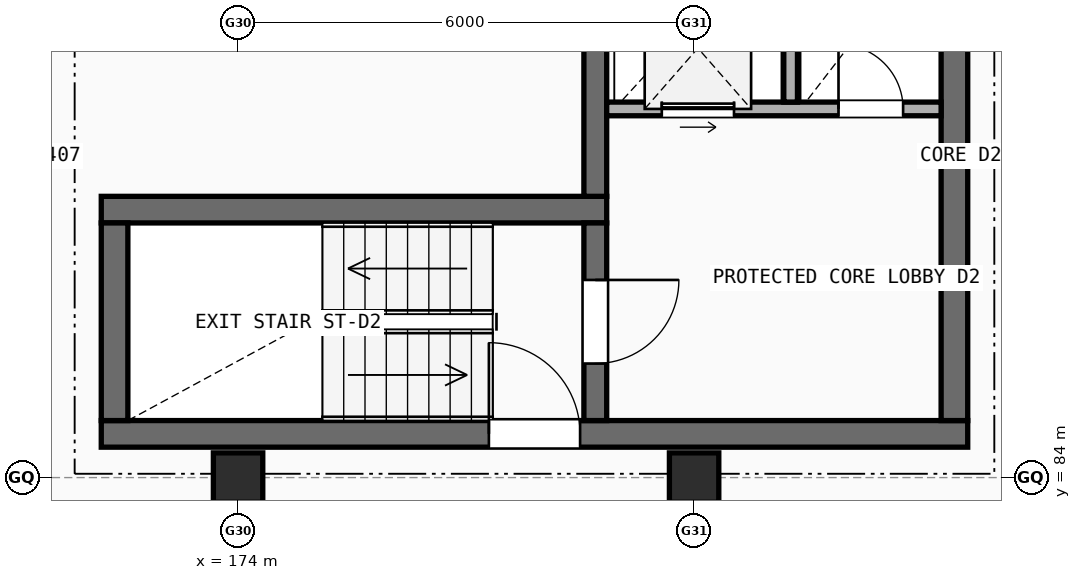
"""IFC4 building model, lengths in metres.
Left out: names, types, materials, properties, quantities, classifications, styles, units other than length and angle.
Written with IfcOpenShell. Run it as: python <this file> out.ifc"""

import sys

from ifc_helpers import new_model, si_unit, direction, frame, frame_2d, origin, origin_2d, place, context, subcontext, project, spatial, rectangle, extrude, element, fill, save


model = new_model("IFC4")
c1 = context("Model", 3, precision=1e-05, world=origin(), true_north=direction((0.0, 1.0)))
c2 = subcontext(c1, "Body", "Model", "MODEL_VIEW")
j1 = project(units=[si_unit("LENGTHUNIT", "METRE"), si_unit("PLANEANGLEUNIT", "RADIAN")], contexts=[c1])
p1 = place(None, origin())
s1 = spatial("IfcSite", under=j1, at=p1, CompositionType="ELEMENT")
p2 = place(p1, origin())
s2 = spatial("IfcBuilding", under=s1, at=p2, CompositionType="ELEMENT")
p3 = place(p2, frame((0.0, 0.0, 10.9)))
s3 = spatial("IfcBuildingStorey", under=s2, at=p3, CompositionType="ELEMENT", Elevation=10.9)
for number, where, z_axis, x_axis in (
    (1, (174.0, 84.0, 0.0), (0.0, 0.0, 1.0), (1.0, 0.0, 0.0)),
    (2, (180.0, 84.0, 0.0), (0.0, 0.0, 1.0), (1.0, 0.0, 0.0)),
):
    element("IfcColumn", number, at=place(p3, frame(where, z_axis=z_axis, x_axis=x_axis)), inside=s3, PredefinedType="COLUMN", context=c2, shape_type="SweptSolid", body=[
        extrude(rectangle(XDim=0.65, YDim=0.65, at=origin_2d()), origin(), (0.0, 0.0, 1.0), 2.96),
    ])
p4 = place(p3, frame((172.2, 84.575, 0.0), z_axis=(0.0, 0.0, 1.0), x_axis=(1.0, 0.0, 0.0)))
e3 = element("IfcWall", 3, at=p4, inside=s3, PredefinedType="SHEAR", context=c2, shape_type="SweptSolid", body=[
    extrude(rectangle(XDim=11.4, YDim=0.35, at=frame_2d((5.7, 0.0))), origin(), (0.0, 0.0, 1.0), 2.96),
])
p5 = place(p4, frame((5.1, 0.0, 0.0)))
e4 = element("IfcOpeningElement", 4, at=p5, cuts=e3, PredefinedType="OPENING", context=c2, shape_type="SweptSolid", body=[
    extrude(rectangle(XDim=1.2, YDim=2.15, at=frame_2d((0.6, 1.075))), frame((0.0, 0.185, 0.0), z_axis=(0.0, -1.0, 0.0), x_axis=(1.0, 0.0, 0.0)), (0.0, 0.0, 1.0), 0.37),
])
p6 = place(p3, frame((178.85, 87.525, 0.0), z_axis=(0.0, 0.0, 1.0), x_axis=(-1.0, 0.0, 0.0)))
e5 = element("IfcWall", 5, at=p6, inside=s3, PredefinedType="SHEAR", context=c2, shape_type="SweptSolid", body=[
    extrude(rectangle(XDim=6.65, YDim=0.35, at=frame_2d((3.325, 0.0))), origin(), (0.0, 0.0, 1.0), 2.96),
])
p7 = place(p3, frame((172.375, 87.35, 0.0), z_axis=(0.0, 0.0, 1.0), x_axis=(0.0, -1.0, 0.0)))
e6 = element("IfcWall", 6, at=p7, inside=s3, PredefinedType="SHEAR", context=c2, shape_type="SweptSolid", body=[
    extrude(rectangle(XDim=2.6, YDim=0.35, at=frame_2d((1.3, 0.0))), origin(), (0.0, 0.0, 1.0), 2.96),
])
p8 = place(p3, frame((178.7, 84.75, 0.0), z_axis=(0.0, 0.0, 1.0), x_axis=(0.0, 1.0, 0.0)))
e7 = element("IfcWall", 7, at=p8, inside=s3, PredefinedType="SHEAR", context=c2, shape_type="SweptSolid", body=[
    extrude(rectangle(XDim=2.6, YDim=0.3, at=frame_2d((1.3, 0.0))), origin(), (0.0, 0.0, 1.0), 2.96),
])
p9 = place(p8, frame((0.75, 0.0, 0.0)))
e8 = element("IfcOpeningElement", 8, at=p9, cuts=e7, PredefinedType="OPENING", context=c2, shape_type="SweptSolid", body=[
    extrude(rectangle(XDim=1.1, YDim=2.15, at=frame_2d((0.55, 1.075))), frame((0.0, 0.16, 0.0), z_axis=(0.0, -1.0, 0.0), x_axis=(1.0, 0.0, 0.0)), (0.0, 0.0, 1.0), 0.32),
])
p10 = place(p3, frame((183.425, 84.75, 0.0), z_axis=(0.0, 0.0, 1.0), x_axis=(0.0, 1.0, 0.0)))
e9 = element("IfcWall", 9, at=p10, inside=s3, PredefinedType="SHEAR", context=c2, shape_type="SweptSolid", body=[
    extrude(rectangle(XDim=6.4, YDim=0.35, at=frame_2d((3.2, 0.0))), origin(), (0.0, 0.0, 1.0), 2.96),
])
p11 = place(p3, frame((178.7, 87.7, 0.0), z_axis=(0.0, 0.0, 1.0), x_axis=(0.0, 1.0, 0.0)))
e10 = element("IfcWall", 10, at=p11, inside=s3, PredefinedType="SHEAR", context=c2, shape_type="SweptSolid", body=[
    extrude(rectangle(XDim=3.45, YDim=0.3, at=frame_2d((1.725, 0.0))), origin(), (0.0, 0.0, 1.0), 2.96),
])
p12 = place(p3, frame((178.85, 88.85, 0.0), z_axis=(0.0, 0.0, 1.0), x_axis=(1.0, 0.0, 0.0)))
e11 = element("IfcWall", 11, at=p12, inside=s3, PredefinedType="SOLIDWALL", context=c2, shape_type="SweptSolid", body=[
    extrude(rectangle(XDim=4.4, YDim=0.18, at=frame_2d((2.2, 0.0))), origin(), (0.0, 0.0, 1.0), 2.96),
])
p13 = place(p12, frame((0.725, 0.0, 0.0)))
e12 = element("IfcOpeningElement", 12, at=p13, cuts=e11, PredefinedType="OPENING", context=c2, shape_type="SweptSolid", body=[
    extrude(rectangle(XDim=0.95, YDim=2.15, at=frame_2d((0.475, 1.075))), frame((0.0, 0.1, 0.0), z_axis=(0.0, -1.0, 0.0), x_axis=(1.0, 0.0, 0.0)), (0.0, 0.0, 1.0), 0.2),
])
p14 = place(p12, frame((3.05, 0.0, 0.0)))
e13 = element("IfcOpeningElement", 13, at=p14, cuts=e11, PredefinedType="OPENING", context=c2, shape_type="SweptSolid", body=[
    extrude(rectangle(XDim=0.85, YDim=2.1, at=frame_2d((0.425, 1.05))), frame((0.0, 0.1, 0.0), z_axis=(0.0, -1.0, 0.0), x_axis=(1.0, 0.0, 0.0)), (0.0, 0.0, 1.0), 0.2),
])
p15 = place(p3, frame((181.27, 88.94, 0.0), z_axis=(0.0, 0.0, 1.0), x_axis=(0.0, 1.0, 0.0)))
e14 = element("IfcWall", 14, at=p15, inside=s3, PredefinedType="SOLIDWALL", context=c2, shape_type="SweptSolid", body=[
    extrude(rectangle(XDim=2.21, YDim=0.18, at=frame_2d((1.105, 0.0))), origin(), (0.0, 0.0, 1.0), 2.96),
])
p16 = place(p5, origin())
e15 = element("IfcDoor", 15, at=p16, inside=s3, OperationType="SINGLE_SWING_LEFT", PredefinedType="DOOR", context=c2, shape_type="SweptSolid", body=[
    extrude(rectangle(XDim=1.2, YDim=2.15, at=frame_2d((0.6, 1.075))), frame((0.0, 0.025, 0.0), z_axis=(0.0, -1.0, 0.0), x_axis=(1.0, 0.0, 0.0)), (0.0, 0.0, 1.0), 0.05),
])
fill(e4, e15)
p17 = place(p9, origin())
e16 = element("IfcDoor", 16, at=p17, inside=s3, OperationType="SINGLE_SWING_RIGHT", PredefinedType="DOOR", context=c2, shape_type="SweptSolid", body=[
    extrude(rectangle(XDim=1.1, YDim=2.15, at=frame_2d((0.55, 1.075))), frame((0.0, 0.025, 0.0), z_axis=(0.0, -1.0, 0.0), x_axis=(1.0, 0.0, 0.0)), (0.0, 0.0, 1.0), 0.05),
])
fill(e8, e16)
p18 = place(p13, origin())
e17 = element("IfcDoor", 17, at=p18, inside=s3, OperationType="SLIDING_TO_LEFT", PredefinedType="DOOR", context=c2, shape_type="SweptSolid", body=[
    extrude(rectangle(XDim=0.95, YDim=2.15, at=frame_2d((0.475, 1.075))), frame((0.0, 0.025, 0.0), z_axis=(0.0, -1.0, 0.0), x_axis=(1.0, 0.0, 0.0)), (0.0, 0.0, 1.0), 0.05),
])
fill(e12, e17)
p19 = place(p14, frame((0.85, 0.0, 0.0), z_axis=(0.0, 0.0, 1.0), x_axis=(-1.0, 0.0, 0.0)))
e18 = element("IfcDoor", 18, at=p19, inside=s3, OperationType="SINGLE_SWING_LEFT", PredefinedType="DOOR", context=c2, shape_type="SweptSolid", body=[
    extrude(rectangle(XDim=0.85, YDim=2.1, at=frame_2d((0.425, 1.05))), frame((0.0, 0.025, 0.0), z_axis=(0.0, -1.0, 0.0), x_axis=(1.0, 0.0, 0.0)), (0.0, 0.0, 1.0), 0.05),
])
fill(e13, e18)
save(model, sys.argv[1])
